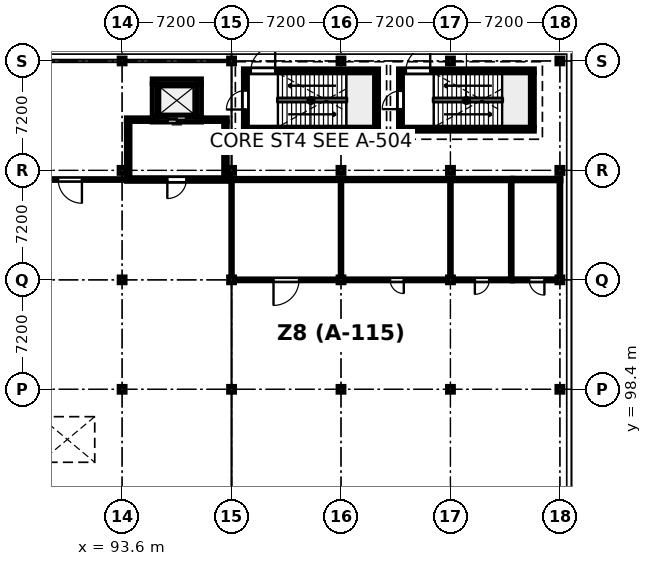
"""IFC4 building model, lengths in metres.
Left out: names, types, materials, properties, quantities, classifications, styles, units other than length and angle.
Written with IfcOpenShell. Run it as: python <this file> out.ifc"""

import sys

from ifc_helpers import new_model, si_unit, direction, frame, frame_2d, origin, origin_2d, place, context, subcontext, project, spatial, rectangle, i_section, extrude, element, fill, save


model = new_model("IFC4")
c1 = context("Model", 3, precision=1e-05, world=origin(), true_north=direction((0.0, 1.0)))
c2 = subcontext(c1, "Body", "Model", "MODEL_VIEW")
j1 = project(units=[si_unit("LENGTHUNIT", "METRE"), si_unit("PLANEANGLEUNIT", "RADIAN")], contexts=[c1])
p1 = place(None, origin())
s1 = spatial("IfcSite", under=j1, at=p1, CompositionType="ELEMENT")
p2 = place(p1, origin())
s2 = spatial("IfcBuilding", under=s1, at=p2, CompositionType="ELEMENT")
p3 = place(p2, origin())
s3 = spatial("IfcBuildingStorey", under=s2, at=p3, CompositionType="ELEMENT", Elevation=0.0)
for number, where, z_axis, x_axis in (
    (1, (93.6, 98.4, 0.0), (0.0, 0.0, 1.0), (1.0, 0.0, 0.0)),
    (2, (93.6, 105.6, 0.0), (0.0, 0.0, 1.0), (1.0, 0.0, 0.0)),
):
    element("IfcColumn", number, at=place(p3, frame(where, z_axis=z_axis, x_axis=x_axis)), inside=s3, PredefinedType="COLUMN", context=c2, shape_type="SweptSolid", body=[
        extrude(i_section(OverallWidth=0.399, OverallDepth=0.394, WebThickness=0.023, FlangeThickness=0.037, FilletRadius=0.015, at=origin_2d()), origin(), (0.0, 0.0, 1.0), 5.4),
    ])
p4 = place(p3, frame((93.6, 112.8, 0.0), z_axis=(0.0, 0.0, 1.0), x_axis=(1.0, 0.0, 0.0)))
e3 = element("IfcColumn", 3, at=p4, inside=s3, PredefinedType="COLUMN", context=c2, shape_type="SweptSolid", body=[
    extrude(i_section(OverallWidth=0.404, OverallDepth=0.406, WebThickness=0.027, FlangeThickness=0.044, FilletRadius=0.015, at=origin_2d()), origin(), (0.0, 0.0, 1.0), 5.4),
])
for number, where, z_axis, x_axis in (
    (4, (93.6, 120.0, 0.0), (0.0, 0.0, 1.0), (1.0, 0.0, 0.0)),
    (5, (100.8, 98.4, 0.0), (0.0, 0.0, 1.0), (1.0, 0.0, 0.0)),
    (6, (100.8, 105.6, 0.0), (0.0, 0.0, 1.0), (1.0, 0.0, 0.0)),
):
    element("IfcColumn", number, at=place(p3, frame(where, z_axis=z_axis, x_axis=x_axis)), inside=s3, PredefinedType="COLUMN", context=c2, shape_type="SweptSolid", body=[
        extrude(i_section(OverallWidth=0.399, OverallDepth=0.394, WebThickness=0.023, FlangeThickness=0.037, FilletRadius=0.015, at=origin_2d()), origin(), (0.0, 0.0, 1.0), 5.4),
    ])
p5 = place(p3, frame((100.8, 112.8, 0.0), z_axis=(0.0, 0.0, 1.0), x_axis=(1.0, 0.0, 0.0)))
e7 = element("IfcColumn", 7, at=p5, inside=s3, PredefinedType="COLUMN", context=c2, shape_type="SweptSolid", body=[
    extrude(i_section(OverallWidth=0.404, OverallDepth=0.406, WebThickness=0.027, FlangeThickness=0.044, FilletRadius=0.015, at=origin_2d()), origin(), (0.0, 0.0, 1.0), 5.4),
])
for number, where, z_axis, x_axis in (
    (8, (100.8, 120.0, 0.0), (0.0, 0.0, 1.0), (1.0, 0.0, 0.0)),
    (9, (108.0, 98.4, 0.0), (0.0, 0.0, 1.0), (1.0, 0.0, 0.0)),
    (10, (108.0, 105.6, 0.0), (0.0, 0.0, 1.0), (1.0, 0.0, 0.0)),
):
    element("IfcColumn", number, at=place(p3, frame(where, z_axis=z_axis, x_axis=x_axis)), inside=s3, PredefinedType="COLUMN", context=c2, shape_type="SweptSolid", body=[
        extrude(i_section(OverallWidth=0.399, OverallDepth=0.394, WebThickness=0.023, FlangeThickness=0.037, FilletRadius=0.015, at=origin_2d()), origin(), (0.0, 0.0, 1.0), 5.4),
    ])
p6 = place(p3, frame((108.0, 112.8, 0.0), z_axis=(0.0, 0.0, 1.0), x_axis=(1.0, 0.0, 0.0)))
e11 = element("IfcColumn", 11, at=p6, inside=s3, PredefinedType="COLUMN", context=c2, shape_type="SweptSolid", body=[
    extrude(i_section(OverallWidth=0.404, OverallDepth=0.406, WebThickness=0.027, FlangeThickness=0.044, FilletRadius=0.015, at=origin_2d()), origin(), (0.0, 0.0, 1.0), 5.4),
])
for number, where, z_axis, x_axis in (
    (12, (108.0, 120.0, 0.0), (0.0, 0.0, 1.0), (1.0, 0.0, 0.0)),
    (13, (115.2, 98.4, 0.0), (0.0, 0.0, 1.0), (1.0, 0.0, 0.0)),
    (14, (115.2, 105.6, 0.0), (0.0, 0.0, 1.0), (1.0, 0.0, 0.0)),
):
    element("IfcColumn", number, at=place(p3, frame(where, z_axis=z_axis, x_axis=x_axis)), inside=s3, PredefinedType="COLUMN", context=c2, shape_type="SweptSolid", body=[
        extrude(i_section(OverallWidth=0.399, OverallDepth=0.394, WebThickness=0.023, FlangeThickness=0.037, FilletRadius=0.015, at=origin_2d()), origin(), (0.0, 0.0, 1.0), 5.4),
    ])
p7 = place(p3, frame((115.2, 112.8, 0.0), z_axis=(0.0, 0.0, 1.0), x_axis=(1.0, 0.0, 0.0)))
e15 = element("IfcColumn", 15, at=p7, inside=s3, PredefinedType="COLUMN", context=c2, shape_type="SweptSolid", body=[
    extrude(i_section(OverallWidth=0.404, OverallDepth=0.406, WebThickness=0.027, FlangeThickness=0.044, FilletRadius=0.015, at=origin_2d()), origin(), (0.0, 0.0, 1.0), 5.4),
])
for number, where, z_axis, x_axis in (
    (16, (115.2, 120.0, 0.0), (0.0, 0.0, 1.0), (1.0, 0.0, 0.0)),
    (17, (122.4, 98.4, 0.0), (0.0, 0.0, 1.0), (1.0, 0.0, 0.0)),
    (18, (122.4, 105.6, 0.0), (0.0, 0.0, 1.0), (1.0, 0.0, 0.0)),
):
    element("IfcColumn", number, at=place(p3, frame(where, z_axis=z_axis, x_axis=x_axis)), inside=s3, PredefinedType="COLUMN", context=c2, shape_type="SweptSolid", body=[
        extrude(i_section(OverallWidth=0.399, OverallDepth=0.394, WebThickness=0.023, FlangeThickness=0.037, FilletRadius=0.015, at=origin_2d()), origin(), (0.0, 0.0, 1.0), 5.4),
    ])
p8 = place(p3, frame((122.4, 112.8, 0.0), z_axis=(0.0, 0.0, 1.0), x_axis=(1.0, 0.0, 0.0)))
e19 = element("IfcColumn", 19, at=p8, inside=s3, PredefinedType="COLUMN", context=c2, shape_type="SweptSolid", body=[
    extrude(i_section(OverallWidth=0.404, OverallDepth=0.406, WebThickness=0.027, FlangeThickness=0.044, FilletRadius=0.015, at=origin_2d()), origin(), (0.0, 0.0, 1.0), 5.4),
])
p9 = place(p3, frame((122.4, 120.0, 0.0), z_axis=(0.0, 0.0, 1.0), x_axis=(1.0, 0.0, 0.0)))
e20 = element("IfcColumn", 20, at=p9, inside=s3, PredefinedType="COLUMN", context=c2, shape_type="SweptSolid", body=[
    extrude(i_section(OverallWidth=0.399, OverallDepth=0.394, WebThickness=0.023, FlangeThickness=0.037, FilletRadius=0.015, at=origin_2d()), origin(), (0.0, 0.0, 1.0), 5.4),
])
p10 = place(p3, frame((110.475, 115.512, 0.0), z_axis=(0.0, 0.0, 1.0), x_axis=(-1.0, 0.0, 0.0)))
e21 = element("IfcWall", 21, at=p10, inside=s3, PredefinedType="SOLIDWALL", context=c2, shape_type="SweptSolid", body=[
    extrude(rectangle(XDim=8.9, YDim=0.275, at=frame_2d((4.45, 0.0))), origin(), (0.0, 0.0, 1.0), 5.16),
])
p11 = place(p3, frame((101.575, 119.348, 0.0), z_axis=(0.0, 0.0, 1.0), x_axis=(1.0, 0.0, 0.0)))
e22 = element("IfcWall", 22, at=p11, inside=s3, PredefinedType="SOLIDWALL", context=c2, shape_type="SweptSolid", body=[
    extrude(rectangle(XDim=8.9, YDim=0.275, at=frame_2d((4.45, 0.0))), origin(), (0.0, 0.0, 1.0), 5.16),
])
p12 = place(p11, frame((0.495, 0.0, 0.0)))
e23 = element("IfcOpeningElement", 23, at=p12, cuts=e22, PredefinedType="OPENING", context=c2, shape_type="SweptSolid", body=[
    extrude(rectangle(XDim=1.6, YDim=2.15, at=frame_2d((0.8, 1.075))), frame((0.0, 0.147, 0.0), z_axis=(0.0, -1.0, 0.0), x_axis=(1.0, 0.0, 0.0)), (0.0, 0.0, 1.0), 0.295),
])
p13 = place(p3, frame((101.712, 115.65, 0.0), z_axis=(0.0, 0.0, 1.0), x_axis=(0.0, 1.0, 0.0)))
e24 = element("IfcWall", 24, at=p13, inside=s3, PredefinedType="SOLIDWALL", context=c2, shape_type="SweptSolid", body=[
    extrude(rectangle(XDim=3.56, YDim=0.275, at=frame_2d((1.78, 0.0))), origin(), (0.0, 0.0, 1.0), 5.16),
])
p14 = place(p13, frame((1.155, 0.0, 0.0)))
e25 = element("IfcOpeningElement", 25, at=p14, cuts=e24, PredefinedType="OPENING", context=c2, shape_type="SweptSolid", body=[
    extrude(rectangle(XDim=1.25, YDim=2.2, at=frame_2d((0.625, 1.1))), frame((0.0, 0.147, 0.0), z_axis=(0.0, -1.0, 0.0), x_axis=(1.0, 0.0, 0.0)), (0.0, 0.0, 1.0), 0.295),
])
p15 = place(p3, frame((110.338, 119.21, 0.0), z_axis=(0.0, 0.0, 1.0), x_axis=(0.0, -1.0, 0.0)))
e26 = element("IfcWall", 26, at=p15, inside=s3, PredefinedType="SOLIDWALL", context=c2, shape_type="SweptSolid", body=[
    extrude(rectangle(XDim=3.56, YDim=0.275, at=frame_2d((1.78, 0.0))), origin(), (0.0, 0.0, 1.0), 5.16),
])
p16 = place(p3, frame((120.725, 115.512, 0.0), z_axis=(0.0, 0.0, 1.0), x_axis=(-1.0, 0.0, 0.0)))
e27 = element("IfcWall", 27, at=p16, inside=s3, PredefinedType="SOLIDWALL", context=c2, shape_type="SweptSolid", body=[
    extrude(rectangle(XDim=8.95, YDim=0.275, at=frame_2d((4.475, 0.0))), origin(), (0.0, 0.0, 1.0), 5.16),
])
p17 = place(p3, frame((111.775, 119.348, 0.0), z_axis=(0.0, 0.0, 1.0), x_axis=(1.0, 0.0, 0.0)))
e28 = element("IfcWall", 28, at=p17, inside=s3, PredefinedType="SOLIDWALL", context=c2, shape_type="SweptSolid", body=[
    extrude(rectangle(XDim=8.95, YDim=0.275, at=frame_2d((4.475, 0.0))), origin(), (0.0, 0.0, 1.0), 5.16),
])
p18 = place(p17, frame((0.495, 0.0, 0.0)))
e29 = element("IfcOpeningElement", 29, at=p18, cuts=e28, PredefinedType="OPENING", context=c2, shape_type="SweptSolid", body=[
    extrude(rectangle(XDim=1.6, YDim=2.15, at=frame_2d((0.8, 1.075))), frame((0.0, 0.147, 0.0), z_axis=(0.0, -1.0, 0.0), x_axis=(1.0, 0.0, 0.0)), (0.0, 0.0, 1.0), 0.295),
])
p19 = place(p3, frame((111.912, 115.65, 0.0), z_axis=(0.0, 0.0, 1.0), x_axis=(0.0, 1.0, 0.0)))
e30 = element("IfcWall", 30, at=p19, inside=s3, PredefinedType="SOLIDWALL", context=c2, shape_type="SweptSolid", body=[
    extrude(rectangle(XDim=3.56, YDim=0.275, at=frame_2d((1.78, 0.0))), origin(), (0.0, 0.0, 1.0), 5.16),
])
p20 = place(p19, frame((1.18, 0.0, 0.0)))
e31 = element("IfcOpeningElement", 31, at=p20, cuts=e30, PredefinedType="OPENING", context=c2, shape_type="SweptSolid", body=[
    extrude(rectangle(XDim=1.2, YDim=2.2, at=frame_2d((0.6, 1.1))), frame((0.0, 0.147, 0.0), z_axis=(0.0, -1.0, 0.0), x_axis=(1.0, 0.0, 0.0)), (0.0, 0.0, 1.0), 0.295),
])
p21 = place(p3, frame((120.588, 119.21, 0.0), z_axis=(0.0, 0.0, 1.0), x_axis=(0.0, -1.0, 0.0)))
e32 = element("IfcWall", 32, at=p21, inside=s3, PredefinedType="SOLIDWALL", context=c2, shape_type="SweptSolid", body=[
    extrude(rectangle(XDim=3.56, YDim=0.275, at=frame_2d((1.78, 0.0))), origin(), (0.0, 0.0, 1.0), 5.16),
])
p22 = place(p3, frame((98.825, 116.138, 0.0), z_axis=(0.0, 0.0, 1.0), x_axis=(-1.0, 0.0, 0.0)))
e33 = element("IfcWall", 33, at=p22, inside=s3, PredefinedType="SHEAR", context=c2, shape_type="SweptSolid", body=[
    extrude(rectangle(XDim=3.25, YDim=0.325, at=frame_2d((1.625, 0.0))), origin(), (0.0, 0.0, 1.0), 5.16),
])
p23 = place(p22, frame((1.025, 0.0, 0.0)))
e34 = element("IfcOpeningElement", 34, at=p23, cuts=e33, PredefinedType="OPENING", context=c2, shape_type="SweptSolid", body=[
    extrude(rectangle(XDim=1.2, YDim=2.2, at=frame_2d((0.6, 1.1))), frame((0.0, 0.172, 0.0), z_axis=(0.0, -1.0, 0.0), x_axis=(1.0, 0.0, 0.0)), (0.0, 0.0, 1.0), 0.345),
])
p24 = place(p3, frame((95.575, 118.662, 0.0), z_axis=(0.0, 0.0, 1.0), x_axis=(1.0, 0.0, 0.0)))
e35 = element("IfcWall", 35, at=p24, inside=s3, PredefinedType="SHEAR", context=c2, shape_type="SweptSolid", body=[
    extrude(rectangle(XDim=3.25, YDim=0.325, at=frame_2d((1.625, 0.0))), origin(), (0.0, 0.0, 1.0), 5.16),
])
for number, where, z_axis, x_axis in (
    (36, (95.738, 116.3, 0.0), (0.0, 0.0, 1.0), (0.0, 1.0, 0.0)),
    (37, (98.662, 118.5, 0.0), (0.0, 0.0, 1.0), (0.0, -1.0, 0.0)),
):
    element("IfcWall", number, at=place(p3, frame(where, z_axis=z_axis, x_axis=x_axis)), inside=s3, PredefinedType="SHEAR", context=c2, shape_type="SweptSolid", body=[
        extrude(rectangle(XDim=2.2, YDim=0.325, at=frame_2d((1.1, 0.0))), origin(), (0.0, 0.0, 1.0), 5.16),
    ])
p25 = place(p3, frame((100.525, 112.2, 0.0), z_axis=(0.0, 0.0, 1.0), x_axis=(-1.0, 0.0, 0.0)))
e38 = element("IfcWall", 38, at=p25, inside=s3, PredefinedType="PARTITIONING", context=c2, shape_type="SweptSolid", body=[
    extrude(rectangle(XDim=6.65, YDim=0.25, at=frame_2d((3.325, 0.0))), origin(), (0.0, 0.0, 1.0), 4.457),
])
p26 = place(p25, frame((2.7, 0.0, 0.0)))
e39 = element("IfcOpeningElement", 39, at=p26, cuts=e38, PredefinedType="OPENING", context=c2, shape_type="SweptSolid", body=[
    extrude(rectangle(XDim=1.25, YDim=2.2, at=frame_2d((0.625, 1.1))), frame((0.0, 0.135, 0.0), z_axis=(0.0, -1.0, 0.0), x_axis=(1.0, 0.0, 0.0)), (0.0, 0.0, 1.0), 0.27),
])
for number, where, z_axis, x_axis in (
    (40, (93.875, 116.138, 0.0), (0.0, 0.0, 1.0), (1.0, 0.0, 0.0)),
    (41, (98.827, 116.138, 0.0), (0.0, 0.0, 1.0), (1.0, 0.0, 0.0)),
):
    element("IfcWall", number, at=place(p3, frame(where, z_axis=z_axis, x_axis=x_axis)), inside=s3, PredefinedType="PARTITIONING", context=c2, shape_type="SweptSolid", body=[
        extrude(rectangle(XDim=1.698, YDim=0.25, at=frame_2d((0.849, 0.0))), origin(), (0.0, 0.0, 1.0), 4.457),
    ])
for number, where, z_axis, x_axis in (
    (42, (94.0, 112.327, 0.0), (0.0, 0.0, 1.0), (0.0, 1.0, 0.0)),
    (43, (100.4, 116.011, 0.0), (0.0, 0.0, 1.0), (0.0, -1.0, 0.0)),
):
    element("IfcWall", number, at=place(p3, frame(where, z_axis=z_axis, x_axis=x_axis)), inside=s3, PredefinedType="PARTITIONING", context=c2, shape_type="SweptSolid", body=[
        extrude(rectangle(XDim=3.684, YDim=0.25, at=frame_2d((1.842, 0.0))), origin(), (0.0, 0.0, 1.0), 4.457),
    ])
p27 = place(p3, frame((93.873, 112.2, 0.0), z_axis=(0.0, 0.0, 1.0), x_axis=(-1.0, 0.0, 0.0)))
e44 = element("IfcWall", 44, at=p27, inside=s3, PredefinedType="PARTITIONING", context=c2, shape_type="SweptSolid", body=[
    extrude(rectangle(XDim=7.391, YDim=0.13, at=frame_2d((3.696, 0.0))), origin(), (0.0, 0.0, 1.0), 4.457),
])
p28 = place(p27, frame((2.916, 0.0, 0.0)))
e45 = element("IfcOpeningElement", 45, at=p28, cuts=e44, PredefinedType="OPENING", context=c2, shape_type="SweptSolid", body=[
    extrude(rectangle(XDim=1.56, YDim=2.16, at=frame_2d((0.78, 1.08))), frame((0.0, 0.075, 0.0), z_axis=(0.0, -1.0, 0.0), x_axis=(1.0, 0.0, 0.0)), (0.0, 0.0, 1.0), 0.15),
])
p29 = place(p3, frame((108.08, 105.6, 0.0), z_axis=(0.0, 0.0, 1.0), x_axis=(-1.0, 0.0, 0.0)))
e46 = element("IfcWall", 46, at=p29, inside=s3, PredefinedType="PARTITIONING", context=c2, shape_type="SweptSolid", body=[
    extrude(rectangle(XDim=7.36, YDim=0.135, at=frame_2d((3.68, 0.0))), origin(), (0.0, 0.0, 1.0), 4.457),
])
p30 = place(p29, frame((2.84, 0.0, 0.0)))
e47 = element("IfcOpeningElement", 47, at=p30, cuts=e46, PredefinedType="OPENING", context=c2, shape_type="SweptSolid", body=[
    extrude(rectangle(XDim=1.68, YDim=2.16, at=frame_2d((0.84, 1.08))), frame((0.0, 0.077, 0.0), z_axis=(0.0, -1.0, 0.0), x_axis=(1.0, 0.0, 0.0)), (0.0, 0.0, 1.0), 0.155),
])
p31 = place(p3, frame((115.28, 105.6, 0.0), z_axis=(0.0, 0.0, 1.0), x_axis=(-1.0, 0.0, 0.0)))
e48 = element("IfcWall", 48, at=p31, inside=s3, PredefinedType="PARTITIONING", context=c2, shape_type="SweptSolid", body=[
    extrude(rectangle(XDim=7.198, YDim=0.14, at=frame_2d((3.599, 0.0))), origin(), (0.0, 0.0, 1.0), 4.457),
])
p32 = place(p31, frame((3.149, 0.0, 0.0)))
e49 = element("IfcOpeningElement", 49, at=p32, cuts=e48, PredefinedType="OPENING", context=c2, shape_type="SweptSolid", body=[
    extrude(rectangle(XDim=0.9, YDim=2.22, at=frame_2d((0.45, 1.11))), frame((0.0, 0.08, 0.0), z_axis=(0.0, -1.0, 0.0), x_axis=(1.0, 0.0, 0.0)), (0.0, 0.0, 1.0), 0.16),
])
p33 = place(p3, frame((119.28, 105.6, 0.0), z_axis=(0.0, 0.0, 1.0), x_axis=(-1.0, 0.0, 0.0)))
e50 = element("IfcWall", 50, at=p33, inside=s3, PredefinedType="PARTITIONING", context=c2, shape_type="SweptSolid", body=[
    extrude(rectangle(XDim=3.998, YDim=0.145, at=frame_2d((1.999, 0.0))), origin(), (0.0, 0.0, 1.0), 4.457),
])
p34 = place(p33, frame((1.524, 0.0, 0.0)))
e51 = element("IfcOpeningElement", 51, at=p34, cuts=e50, PredefinedType="OPENING", context=c2, shape_type="SweptSolid", body=[
    extrude(rectangle(XDim=0.95, YDim=2.22, at=frame_2d((0.475, 1.11))), frame((0.0, 0.083, 0.0), z_axis=(0.0, -1.0, 0.0), x_axis=(1.0, 0.0, 0.0)), (0.0, 0.0, 1.0), 0.165),
])
p35 = place(p3, frame((122.48, 105.6, 0.0), z_axis=(0.0, 0.0, 1.0), x_axis=(-1.0, 0.0, 0.0)))
e52 = element("IfcWall", 52, at=p35, inside=s3, PredefinedType="PARTITIONING", context=c2, shape_type="SweptSolid", body=[
    extrude(rectangle(XDim=3.198, YDim=0.15, at=frame_2d((1.599, 0.0))), origin(), (0.0, 0.0, 1.0), 4.457),
])
p36 = place(p35, frame((1.099, 0.0, 0.0)))
e53 = element("IfcOpeningElement", 53, at=p36, cuts=e52, PredefinedType="OPENING", context=c2, shape_type="SweptSolid", body=[
    extrude(rectangle(XDim=1.0, YDim=2.22, at=frame_2d((0.5, 1.11))), frame((0.0, 0.085, 0.0), z_axis=(0.0, -1.0, 0.0), x_axis=(1.0, 0.0, 0.0)), (0.0, 0.0, 1.0), 0.17),
])
p37 = place(p3, frame((100.72, 112.2, 0.0), z_axis=(0.0, 0.0, 1.0), x_axis=(1.0, 0.0, 0.0)))
e54 = element("IfcWall", 54, at=p37, inside=s3, PredefinedType="PARTITIONING", context=c2, shape_type="SweptSolid", body=[
    extrude(rectangle(XDim=7.36, YDim=0.165, at=frame_2d((3.68, 0.0))), origin(), (0.0, 0.0, 1.0), 4.457),
])
p38 = place(p3, frame((108.082, 112.2, 0.0), z_axis=(0.0, 0.0, 1.0), x_axis=(1.0, 0.0, 0.0)))
e55 = element("IfcWall", 55, at=p38, inside=s3, PredefinedType="PARTITIONING", context=c2, shape_type="SweptSolid", body=[
    extrude(rectangle(XDim=7.198, YDim=0.17, at=frame_2d((3.599, 0.0))), origin(), (0.0, 0.0, 1.0), 4.457),
])
p39 = place(p3, frame((115.282, 112.2, 0.0), z_axis=(0.0, 0.0, 1.0), x_axis=(1.0, 0.0, 0.0)))
e56 = element("IfcWall", 56, at=p39, inside=s3, PredefinedType="PARTITIONING", context=c2, shape_type="SweptSolid", body=[
    extrude(rectangle(XDim=3.998, YDim=0.178, at=frame_2d((1.999, 0.0))), origin(), (0.0, 0.0, 1.0), 4.457),
])
p40 = place(p3, frame((119.282, 112.2, 0.0), z_axis=(0.0, 0.0, 1.0), x_axis=(1.0, 0.0, 0.0)))
e57 = element("IfcWall", 57, at=p40, inside=s3, PredefinedType="PARTITIONING", context=c2, shape_type="SweptSolid", body=[
    extrude(rectangle(XDim=3.198, YDim=0.185, at=frame_2d((1.599, 0.0))), origin(), (0.0, 0.0, 1.0), 4.457),
])
p41 = place(p3, frame((100.8, 105.67, 0.0), z_axis=(0.0, 0.0, 1.0), x_axis=(0.0, 1.0, 0.0)))
e58 = element("IfcWall", 58, at=p41, inside=s3, PredefinedType="PARTITIONING", context=c2, shape_type="SweptSolid", body=[
    extrude(rectangle(XDim=6.446, YDim=0.11, at=frame_2d((3.223, 0.0))), origin(), (0.0, 0.0, 1.0), 4.457),
])
p42 = place(p3, frame((108.0, 112.113, 0.0), z_axis=(0.0, 0.0, 1.0), x_axis=(0.0, -1.0, 0.0)))
e59 = element("IfcWall", 59, at=p42, inside=s3, PredefinedType="PARTITIONING", context=c2, shape_type="SweptSolid", body=[
    extrude(rectangle(XDim=6.441, YDim=0.115, at=frame_2d((3.22, 0.0))), origin(), (0.0, 0.0, 1.0), 4.457),
])
p43 = place(p3, frame((115.2, 112.109, 0.0), z_axis=(0.0, 0.0, 1.0), x_axis=(0.0, -1.0, 0.0)))
e60 = element("IfcWall", 60, at=p43, inside=s3, PredefinedType="PARTITIONING", context=c2, shape_type="SweptSolid", body=[
    extrude(rectangle(XDim=6.435, YDim=0.12, at=frame_2d((3.217, 0.0))), origin(), (0.0, 0.0, 1.0), 4.457),
])
p44 = place(p3, frame((119.2, 112.106, 0.0), z_axis=(0.0, 0.0, 1.0), x_axis=(0.0, -1.0, 0.0)))
e61 = element("IfcWall", 61, at=p44, inside=s3, PredefinedType="PARTITIONING", context=c2, shape_type="SweptSolid", body=[
    extrude(rectangle(XDim=6.429, YDim=0.125, at=frame_2d((3.214, 0.0))), origin(), (0.0, 0.0, 1.0), 4.457),
])
p45 = place(p3, frame((122.4, 112.106, 0.0), z_axis=(0.0, 0.0, 1.0), x_axis=(0.0, -1.0, 0.0)))
e62 = element("IfcWall", 62, at=p45, inside=s3, PredefinedType="PARTITIONING", context=c2, shape_type="SweptSolid", body=[
    extrude(rectangle(XDim=6.429, YDim=0.13, at=frame_2d((3.214, 0.0))), origin(), (0.0, 0.0, 1.0), 4.457),
])
p46 = place(p12, origin())
e63 = element("IfcDoor", 63, at=p46, inside=s3, OperationType="SINGLE_SWING_RIGHT", PredefinedType="DOOR", context=c2, shape_type="SweptSolid", body=[
    extrude(rectangle(XDim=1.6, YDim=2.15, at=frame_2d((0.8, 1.075))), frame((0.0, 0.025, 0.0), z_axis=(0.0, -1.0, 0.0), x_axis=(1.0, 0.0, 0.0)), (0.0, 0.0, 1.0), 0.05),
])
fill(e23, e63)
p47 = place(p14, origin())
e64 = element("IfcDoor", 64, at=p47, inside=s3, OperationType="SINGLE_SWING_LEFT", PredefinedType="DOOR", context=c2, shape_type="SweptSolid", body=[
    extrude(rectangle(XDim=1.25, YDim=2.2, at=frame_2d((0.625, 1.1))), frame((0.0, 0.025, 0.0), z_axis=(0.0, -1.0, 0.0), x_axis=(1.0, 0.0, 0.0)), (0.0, 0.0, 1.0), 0.05),
])
fill(e25, e64)
p48 = place(p18, origin())
e65 = element("IfcDoor", 65, at=p48, inside=s3, OperationType="SINGLE_SWING_RIGHT", PredefinedType="DOOR", context=c2, shape_type="SweptSolid", body=[
    extrude(rectangle(XDim=1.6, YDim=2.15, at=frame_2d((0.8, 1.075))), frame((0.0, 0.025, 0.0), z_axis=(0.0, -1.0, 0.0), x_axis=(1.0, 0.0, 0.0)), (0.0, 0.0, 1.0), 0.05),
])
fill(e29, e65)
p49 = place(p20, origin())
e66 = element("IfcDoor", 66, at=p49, inside=s3, OperationType="SINGLE_SWING_LEFT", PredefinedType="DOOR", context=c2, shape_type="SweptSolid", body=[
    extrude(rectangle(XDim=1.2, YDim=2.2, at=frame_2d((0.6, 1.1))), frame((0.0, 0.025, 0.0), z_axis=(0.0, -1.0, 0.0), x_axis=(1.0, 0.0, 0.0)), (0.0, 0.0, 1.0), 0.05),
])
fill(e31, e66)
p50 = place(p23, origin())
e67 = element("IfcDoor", 67, at=p50, inside=s3, OperationType="DOUBLE_DOOR_SLIDING", PredefinedType="DOOR", context=c2, shape_type="SweptSolid", body=[
    extrude(rectangle(XDim=1.2, YDim=2.2, at=frame_2d((0.6, 1.1))), frame((0.0, 0.025, 0.0), z_axis=(0.0, -1.0, 0.0), x_axis=(1.0, 0.0, 0.0)), (0.0, 0.0, 1.0), 0.05),
])
fill(e34, e67)
p51 = place(p26, origin())
e68 = element("IfcDoor", 68, at=p51, inside=s3, OperationType="SINGLE_SWING_RIGHT", PredefinedType="DOOR", context=c2, shape_type="SweptSolid", body=[
    extrude(rectangle(XDim=1.25, YDim=2.2, at=frame_2d((0.625, 1.1))), frame((0.0, 0.025, 0.0), z_axis=(0.0, -1.0, 0.0), x_axis=(1.0, 0.0, 0.0)), (0.0, 0.0, 1.0), 0.05),
])
fill(e39, e68)
p52 = place(p28, origin())
e69 = element("IfcDoor", 69, at=p52, inside=s3, OperationType="SINGLE_SWING_LEFT", PredefinedType="DOOR", context=c2, shape_type="SweptSolid", body=[
    extrude(rectangle(XDim=1.56, YDim=2.16, at=frame_2d((0.78, 1.08))), frame((0.0, 0.025, 0.0), z_axis=(0.0, -1.0, 0.0), x_axis=(1.0, 0.0, 0.0)), (0.0, 0.0, 1.0), 0.05),
])
fill(e45, e69)
p53 = place(p30, origin())
e70 = element("IfcDoor", 70, at=p53, inside=s3, OperationType="SINGLE_SWING_RIGHT", PredefinedType="DOOR", context=c2, shape_type="SweptSolid", body=[
    extrude(rectangle(XDim=1.68, YDim=2.16, at=frame_2d((0.84, 1.08))), frame((0.0, 0.025, 0.0), z_axis=(0.0, -1.0, 0.0), x_axis=(1.0, 0.0, 0.0)), (0.0, 0.0, 1.0), 0.05),
])
fill(e47, e70)
p54 = place(p32, origin())
e71 = element("IfcDoor", 71, at=p54, inside=s3, OperationType="SINGLE_SWING_LEFT", PredefinedType="DOOR", context=c2, shape_type="SweptSolid", body=[
    extrude(rectangle(XDim=0.9, YDim=2.22, at=frame_2d((0.45, 1.11))), frame((0.0, 0.025, 0.0), z_axis=(0.0, -1.0, 0.0), x_axis=(1.0, 0.0, 0.0)), (0.0, 0.0, 1.0), 0.05),
])
fill(e49, e71)
p55 = place(p34, origin())
e72 = element("IfcDoor", 72, at=p55, inside=s3, OperationType="SINGLE_SWING_RIGHT", PredefinedType="DOOR", context=c2, shape_type="SweptSolid", body=[
    extrude(rectangle(XDim=0.95, YDim=2.22, at=frame_2d((0.475, 1.11))), frame((0.0, 0.025, 0.0), z_axis=(0.0, -1.0, 0.0), x_axis=(1.0, 0.0, 0.0)), (0.0, 0.0, 1.0), 0.05),
])
fill(e51, e72)
p56 = place(p36, origin())
e73 = element("IfcDoor", 73, at=p56, inside=s3, OperationType="SINGLE_SWING_LEFT", PredefinedType="DOOR", context=c2, shape_type="SweptSolid", body=[
    extrude(rectangle(XDim=1.0, YDim=2.22, at=frame_2d((0.5, 1.11))), frame((0.0, 0.025, 0.0), z_axis=(0.0, -1.0, 0.0), x_axis=(1.0, 0.0, 0.0)), (0.0, 0.0, 1.0), 0.05),
])
fill(e53, e73)
save(model, sys.argv[1])
